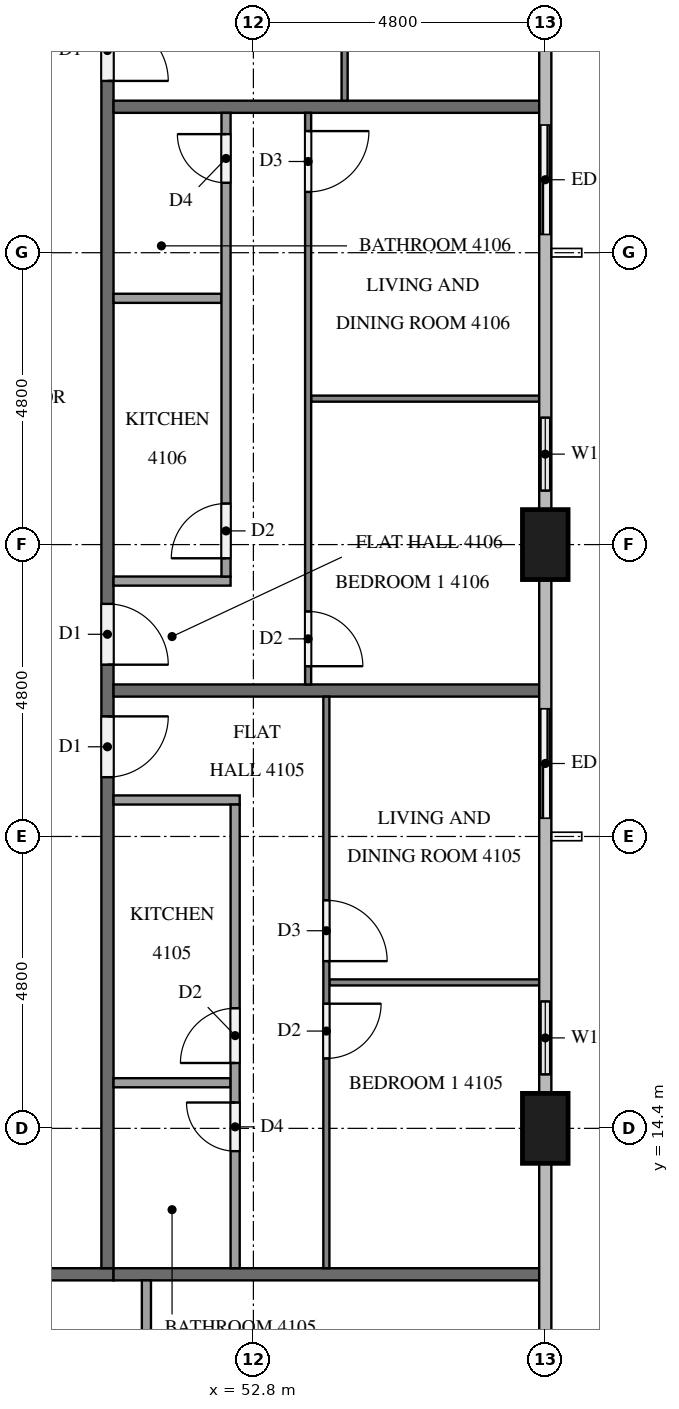
"""IFC4 building model, lengths in metres.
Left out: names, types, materials, properties, quantities, classifications, styles, units other than length and angle.
Written with IfcOpenShell. Run it as: python <this file> out.ifc"""

import sys

from ifc_helpers import new_model, si_unit, direction, frame, frame_2d, origin, origin_2d, place, context, subcontext, project, spatial, rectangle, extrude, element, fill, save


model = new_model("IFC4")
c1 = context("Model", 3, precision=1e-05, world=origin(), true_north=direction((0.0, 1.0)))
c2 = subcontext(c1, "Body", "Model", "MODEL_VIEW")
j1 = project(units=[si_unit("LENGTHUNIT", "METRE"), si_unit("PLANEANGLEUNIT", "RADIAN")], contexts=[c1])
p1 = place(None, origin())
s1 = spatial("IfcSite", under=j1, at=p1, CompositionType="ELEMENT")
p2 = place(p1, origin())
s2 = spatial("IfcBuilding", under=s1, at=p2, CompositionType="ELEMENT")
p3 = place(p2, frame((0.0, 0.0, 159.5)))
s3 = spatial("IfcBuildingStorey", under=s2, at=p3, CompositionType="ELEMENT", Elevation=159.5)
for number, where, z_axis, x_axis in (
    (1, (57.6, 14.4, 0.0), (0.0, 0.0, 1.0), (0.0, 1.0, 0.0)),
    (2, (57.6, 24.0, 0.0), (0.0, 0.0, 1.0), (0.0, 1.0, 0.0)),
):
    element("IfcColumn", number, at=place(p3, frame(where, z_axis=z_axis, x_axis=x_axis)), inside=s3, PredefinedType="COLUMN", context=c2, shape_type="SweptSolid", body=[
        extrude(rectangle(XDim=1.15, YDim=0.75, at=origin_2d()), origin(), (0.0, 0.0, 1.0), 3.2),
    ])
p4 = place(p3, frame((57.6, 14.975, 0.0), z_axis=(0.0, 0.0, 1.0), x_axis=(0.0, 1.0, 0.0)))
e3 = element("IfcWall", 3, at=p4, inside=s3, PredefinedType="SOLIDWALL", context=c2, shape_type="SweptSolid", body=[
    extrude(rectangle(XDim=1.825, YDim=0.15, at=frame_2d((0.913, 0.0))), origin(), (0.0, 0.0, 1.0), 3.2),
])
p5 = place(p4, frame((0.312, 0.0, 0.9)))
e4 = element("IfcOpeningElement", 4, at=p5, cuts=e3, PredefinedType="OPENING", context=c2, shape_type="SweptSolid", body=[
    extrude(rectangle(XDim=1.2, YDim=1.4, at=frame_2d((0.6, 0.7))), frame((0.0, 0.085, 0.0), z_axis=(0.0, -1.0, 0.0), x_axis=(1.0, 0.0, 0.0)), (0.0, 0.0, 1.0), 0.17),
])
p6 = place(p3, frame((57.6, 19.2, 0.0), z_axis=(0.0, 0.0, 1.0), x_axis=(0.0, 1.0, 0.0)))
e5 = element("IfcWall", 5, at=p6, inside=s3, PredefinedType="SOLIDWALL", context=c2, shape_type="SweptSolid", body=[
    extrude(rectangle(XDim=2.4, YDim=0.15, at=frame_2d((1.2, 0.0))), origin(), (0.0, 0.0, 1.0), 3.2),
])
p7 = place(p6, frame((0.3, 0.0, 0.0)))
e6 = element("IfcOpeningElement", 6, at=p7, cuts=e5, PredefinedType="OPENING", context=c2, shape_type="SweptSolid", body=[
    extrude(rectangle(XDim=1.8, YDim=2.4, at=frame_2d((0.9, 1.2))), frame((0.0, 0.085, 0.0), z_axis=(0.0, -1.0, 0.0), x_axis=(1.0, 0.0, 0.0)), (0.0, 0.0, 1.0), 0.17),
])
p8 = place(p3, frame((57.6, 24.575, 0.0), z_axis=(0.0, 0.0, 1.0), x_axis=(0.0, 1.0, 0.0)))
e7 = element("IfcWall", 7, at=p8, inside=s3, PredefinedType="SOLIDWALL", context=c2, shape_type="SweptSolid", body=[
    extrude(rectangle(XDim=1.825, YDim=0.15, at=frame_2d((0.913, 0.0))), origin(), (0.0, 0.0, 1.0), 3.2),
])
p9 = place(p8, frame((0.312, 0.0, 0.9)))
e8 = element("IfcOpeningElement", 8, at=p9, cuts=e7, PredefinedType="OPENING", context=c2, shape_type="SweptSolid", body=[
    extrude(rectangle(XDim=1.2, YDim=1.4, at=frame_2d((0.6, 0.7))), frame((0.0, 0.085, 0.0), z_axis=(0.0, -1.0, 0.0), x_axis=(1.0, 0.0, 0.0)), (0.0, 0.0, 1.0), 0.17),
])
p10 = place(p3, frame((57.6, 28.8, 0.0), z_axis=(0.0, 0.0, 1.0), x_axis=(0.0, 1.0, 0.0)))
e9 = element("IfcWall", 9, at=p10, inside=s3, PredefinedType="SOLIDWALL", context=c2, shape_type="SweptSolid", body=[
    extrude(rectangle(XDim=2.4, YDim=0.15, at=frame_2d((1.2, 0.0))), origin(), (0.0, 0.0, 1.0), 3.2),
])
p11 = place(p10, frame((0.3, 0.0, 0.0)))
e10 = element("IfcOpeningElement", 10, at=p11, cuts=e9, PredefinedType="OPENING", context=c2, shape_type="SweptSolid", body=[
    extrude(rectangle(XDim=1.8, YDim=2.4, at=frame_2d((0.9, 1.2))), frame((0.0, 0.085, 0.0), z_axis=(0.0, -1.0, 0.0), x_axis=(1.0, 0.0, 0.0)), (0.0, 0.0, 1.0), 0.17),
])
p12 = place(p3, frame((50.5, 12.0, 0.0), z_axis=(0.0, 0.0, 1.0), x_axis=(-1.0, 0.0, 0.0)))
e11 = element("IfcWall", 11, at=p12, inside=s3, PredefinedType="PARTITIONING", context=c2, shape_type="SweptSolid", body=[
    extrude(rectangle(XDim=38.6, YDim=0.2, at=frame_2d((19.3, 0.0))), origin(), (0.0, 0.0, 1.0), 3.2),
])
p13 = place(p12, frame((34.125, 0.0, 0.0)))
e12 = element("IfcOpeningElement", 12, at=p13, cuts=e11, PredefinedType="OPENING", context=c2, shape_type="SweptSolid", body=[
    extrude(rectangle(XDim=1.0, YDim=2.1, at=frame_2d((0.5, 1.05))), frame((0.0, 0.11, 0.0), z_axis=(0.0, -1.0, 0.0), x_axis=(1.0, 0.0, 0.0)), (0.0, 0.0, 1.0), 0.22),
])
p14 = place(p12, frame((32.275, 0.0, 0.0)))
e13 = element("IfcOpeningElement", 13, at=p14, cuts=e11, PredefinedType="OPENING", context=c2, shape_type="SweptSolid", body=[
    extrude(rectangle(XDim=1.0, YDim=2.1, at=frame_2d((0.5, 1.05))), frame((0.0, 0.11, 0.0), z_axis=(0.0, -1.0, 0.0), x_axis=(1.0, 0.0, 0.0)), (0.0, 0.0, 1.0), 0.22),
])
p15 = place(p12, frame((12.525, 0.0, 0.0)))
e14 = element("IfcOpeningElement", 14, at=p15, cuts=e11, PredefinedType="OPENING", context=c2, shape_type="SweptSolid", body=[
    extrude(rectangle(XDim=1.0, YDim=2.1, at=frame_2d((0.5, 1.05))), frame((0.0, 0.11, 0.0), z_axis=(0.0, -1.0, 0.0), x_axis=(1.0, 0.0, 0.0)), (0.0, 0.0, 1.0), 0.22),
])
p16 = place(p12, frame((10.625, 0.0, 0.0)))
e15 = element("IfcOpeningElement", 15, at=p16, cuts=e11, PredefinedType="OPENING", context=c2, shape_type="SweptSolid", body=[
    extrude(rectangle(XDim=1.1, YDim=2.1, at=frame_2d((0.55, 1.05))), frame((0.0, 0.11, 0.0), z_axis=(0.0, -1.0, 0.0), x_axis=(1.0, 0.0, 0.0)), (0.0, 0.0, 1.0), 0.22),
])
p17 = place(p3, frame((50.4, 40.7, 0.0), z_axis=(0.0, 0.0, 1.0), x_axis=(0.0, -1.0, 0.0)))
e16 = element("IfcWall", 16, at=p17, inside=s3, PredefinedType="PARTITIONING", context=c2, shape_type="SweptSolid", body=[
    extrude(rectangle(XDim=28.6, YDim=0.2, at=frame_2d((14.3, 0.0))), origin(), (0.0, 0.0, 1.0), 3.2),
])
p18 = place(p17, frame((19.525, 0.0, 0.0)))
e17 = element("IfcOpeningElement", 17, at=p18, cuts=e16, PredefinedType="OPENING", context=c2, shape_type="SweptSolid", body=[
    extrude(rectangle(XDim=1.0, YDim=2.1, at=frame_2d((0.5, 1.05))), frame((0.0, 0.11, 0.0), z_axis=(0.0, -1.0, 0.0), x_axis=(1.0, 0.0, 0.0)), (0.0, 0.0, 1.0), 0.22),
])
p19 = place(p17, frame((17.675, 0.0, 0.0)))
e18 = element("IfcOpeningElement", 18, at=p19, cuts=e16, PredefinedType="OPENING", context=c2, shape_type="SweptSolid", body=[
    extrude(rectangle(XDim=1.0, YDim=2.1, at=frame_2d((0.5, 1.05))), frame((0.0, 0.11, 0.0), z_axis=(0.0, -1.0, 0.0), x_axis=(1.0, 0.0, 0.0)), (0.0, 0.0, 1.0), 0.22),
])
p20 = place(p17, frame((8.075, 0.0, 0.0)))
e19 = element("IfcOpeningElement", 19, at=p20, cuts=e16, PredefinedType="OPENING", context=c2, shape_type="SweptSolid", body=[
    extrude(rectangle(XDim=1.0, YDim=2.1, at=frame_2d((0.5, 1.05))), frame((0.0, 0.11, 0.0), z_axis=(0.0, -1.0, 0.0), x_axis=(1.0, 0.0, 0.0)), (0.0, 0.0, 1.0), 0.22),
])
for number, where, z_axis, x_axis in (
    (20, (50.5, 12.0, 0.0), (0.0, 0.0, 1.0), (1.0, 0.0, 0.0)),
    (21, (50.5, 21.6, 0.0), (0.0, 0.0, 1.0), (1.0, 0.0, 0.0)),
    (22, (50.5, 31.2, 0.0), (0.0, 0.0, 1.0), (1.0, 0.0, 0.0)),
):
    element("IfcWall", number, at=place(p3, frame(where, z_axis=z_axis, x_axis=x_axis)), inside=s3, PredefinedType="PARTITIONING", context=c2, shape_type="SweptSolid", body=[
        extrude(rectangle(XDim=7.0, YDim=0.2, at=frame_2d((3.5, 0.0))), origin(), (0.0, 0.0, 1.0), 3.2),
    ])
p21 = place(p3, frame((51.041, 11.9, 0.0), z_axis=(0.0, 0.0, 1.0), x_axis=(0.0, -1.0, 0.0)))
e23 = element("IfcWall", 23, at=p21, inside=s3, PredefinedType="PARTITIONING", context=c2, shape_type="SweptSolid", body=[
    extrude(rectangle(XDim=4.175, YDim=0.15, at=frame_2d((2.087, 0.0))), origin(), (0.0, 0.0, 1.0), 3.2),
])
p22 = place(p3, frame((54.05, 16.8, 0.0), z_axis=(0.0, 0.0, 1.0), x_axis=(1.0, 0.0, 0.0)))
e24 = element("IfcWall", 24, at=p22, inside=s3, PredefinedType="PARTITIONING", context=c2, shape_type="SweptSolid", body=[
    extrude(rectangle(XDim=3.45, YDim=0.1, at=frame_2d((1.725, 0.0))), origin(), (0.0, 0.0, 1.0), 3.2),
])
p23 = place(p3, frame((54.0, 21.5, 0.0), z_axis=(0.0, 0.0, 1.0), x_axis=(0.0, -1.0, 0.0)))
e25 = element("IfcWall", 25, at=p23, inside=s3, PredefinedType="PARTITIONING", context=c2, shape_type="SweptSolid", body=[
    extrude(rectangle(XDim=9.4, YDim=0.1, at=frame_2d((4.7, 0.0))), origin(), (0.0, 0.0, 1.0), 3.2),
])
p24 = place(p23, frame((3.35, 0.0, 0.0)))
e26 = element("IfcOpeningElement", 26, at=p24, cuts=e25, PredefinedType="OPENING", context=c2, shape_type="SweptSolid", body=[
    extrude(rectangle(XDim=1.0, YDim=2.1, at=frame_2d((0.5, 1.05))), frame((0.0, 0.06, 0.0), z_axis=(0.0, -1.0, 0.0), x_axis=(1.0, 0.0, 0.0)), (0.0, 0.0, 1.0), 0.12),
])
p25 = place(p23, frame((5.05, 0.0, 0.0)))
e27 = element("IfcOpeningElement", 27, at=p25, cuts=e25, PredefinedType="OPENING", context=c2, shape_type="SweptSolid", body=[
    extrude(rectangle(XDim=0.9, YDim=2.1, at=frame_2d((0.45, 1.05))), frame((0.0, 0.06, 0.0), z_axis=(0.0, -1.0, 0.0), x_axis=(1.0, 0.0, 0.0)), (0.0, 0.0, 1.0), 0.12),
])
p26 = place(p3, frame((50.5, 15.15, 0.0), z_axis=(0.0, 0.0, 1.0), x_axis=(1.0, 0.0, 0.0)))
e28 = element("IfcWall", 28, at=p26, inside=s3, PredefinedType="PARTITIONING", context=c2, shape_type="SweptSolid", body=[
    extrude(rectangle(XDim=1.925, YDim=0.15, at=frame_2d((0.962, 0.0))), origin(), (0.0, 0.0, 1.0), 3.2),
])
p27 = place(p3, frame((50.5, 19.8, 0.0), z_axis=(0.0, 0.0, 1.0), x_axis=(1.0, 0.0, 0.0)))
e29 = element("IfcWall", 29, at=p27, inside=s3, PredefinedType="PARTITIONING", context=c2, shape_type="SweptSolid", body=[
    extrude(rectangle(XDim=2.075, YDim=0.15, at=frame_2d((1.038, 0.0))), origin(), (0.0, 0.0, 1.0), 3.2),
])
p28 = place(p3, frame((52.5, 12.1, 0.0), z_axis=(0.0, 0.0, 1.0), x_axis=(0.0, 1.0, 0.0)))
e30 = element("IfcWall", 30, at=p28, inside=s3, PredefinedType="PARTITIONING", context=c2, shape_type="SweptSolid", body=[
    extrude(rectangle(XDim=7.625, YDim=0.15, at=frame_2d((3.812, 0.0))), origin(), (0.0, 0.0, 1.0), 3.2),
])
p29 = place(p28, frame((3.375, 0.0, 0.0)))
e31 = element("IfcOpeningElement", 31, at=p29, cuts=e30, PredefinedType="OPENING", context=c2, shape_type="SweptSolid", body=[
    extrude(rectangle(XDim=0.9, YDim=2.1, at=frame_2d((0.45, 1.05))), frame((0.0, 0.085, 0.0), z_axis=(0.0, -1.0, 0.0), x_axis=(1.0, 0.0, 0.0)), (0.0, 0.0, 1.0), 0.17),
])
p30 = place(p28, frame((1.925, 0.0, 0.0)))
e32 = element("IfcOpeningElement", 32, at=p30, cuts=e30, PredefinedType="OPENING", context=c2, shape_type="SweptSolid", body=[
    extrude(rectangle(XDim=0.8, YDim=2.1, at=frame_2d((0.4, 1.05))), frame((0.0, 0.085, 0.0), z_axis=(0.0, -1.0, 0.0), x_axis=(1.0, 0.0, 0.0)), (0.0, 0.0, 1.0), 0.17),
])
p31 = place(p3, frame((53.75, 26.4, 0.0), z_axis=(0.0, 0.0, 1.0), x_axis=(1.0, 0.0, 0.0)))
e33 = element("IfcWall", 33, at=p31, inside=s3, PredefinedType="PARTITIONING", context=c2, shape_type="SweptSolid", body=[
    extrude(rectangle(XDim=3.75, YDim=0.1, at=frame_2d((1.875, 0.0))), origin(), (0.0, 0.0, 1.0), 3.2),
])
p32 = place(p3, frame((53.7, 31.1, 0.0), z_axis=(0.0, 0.0, 1.0), x_axis=(0.0, -1.0, 0.0)))
e34 = element("IfcWall", 34, at=p32, inside=s3, PredefinedType="PARTITIONING", context=c2, shape_type="SweptSolid", body=[
    extrude(rectangle(XDim=9.4, YDim=0.1, at=frame_2d((4.7, 0.0))), origin(), (0.0, 0.0, 1.0), 3.2),
])
p33 = place(p32, frame((8.2, 0.0, 0.0)))
e35 = element("IfcOpeningElement", 35, at=p33, cuts=e34, PredefinedType="OPENING", context=c2, shape_type="SweptSolid", body=[
    extrude(rectangle(XDim=0.9, YDim=2.1, at=frame_2d((0.45, 1.05))), frame((0.0, 0.06, 0.0), z_axis=(0.0, -1.0, 0.0), x_axis=(1.0, 0.0, 0.0)), (0.0, 0.0, 1.0), 0.12),
])
p34 = place(p32, frame((0.3, 0.0, 0.0)))
e36 = element("IfcOpeningElement", 36, at=p34, cuts=e34, PredefinedType="OPENING", context=c2, shape_type="SweptSolid", body=[
    extrude(rectangle(XDim=1.0, YDim=2.1, at=frame_2d((0.5, 1.05))), frame((0.0, 0.06, 0.0), z_axis=(0.0, -1.0, 0.0), x_axis=(1.0, 0.0, 0.0)), (0.0, 0.0, 1.0), 0.12),
])
p35 = place(p3, frame((50.5, 28.05, 0.0), z_axis=(0.0, 0.0, 1.0), x_axis=(1.0, 0.0, 0.0)))
e37 = element("IfcWall", 37, at=p35, inside=s3, PredefinedType="PARTITIONING", context=c2, shape_type="SweptSolid", body=[
    extrude(rectangle(XDim=1.775, YDim=0.15, at=frame_2d((0.887, 0.0))), origin(), (0.0, 0.0, 1.0), 3.2),
])
p36 = place(p3, frame((50.5, 23.4, 0.0), z_axis=(0.0, 0.0, 1.0), x_axis=(1.0, 0.0, 0.0)))
e38 = element("IfcWall", 38, at=p36, inside=s3, PredefinedType="PARTITIONING", context=c2, shape_type="SweptSolid", body=[
    extrude(rectangle(XDim=1.925, YDim=0.15, at=frame_2d((0.962, 0.0))), origin(), (0.0, 0.0, 1.0), 3.2),
])
p37 = place(p3, frame((52.35, 23.475, 0.0), z_axis=(0.0, 0.0, 1.0), x_axis=(0.0, 1.0, 0.0)))
e39 = element("IfcWall", 39, at=p37, inside=s3, PredefinedType="PARTITIONING", context=c2, shape_type="SweptSolid", body=[
    extrude(rectangle(XDim=7.625, YDim=0.15, at=frame_2d((3.812, 0.0))), origin(), (0.0, 0.0, 1.0), 3.2),
])
p38 = place(p37, frame((0.3, 0.0, 0.0)))
e40 = element("IfcOpeningElement", 40, at=p38, cuts=e39, PredefinedType="OPENING", context=c2, shape_type="SweptSolid", body=[
    extrude(rectangle(XDim=0.9, YDim=2.1, at=frame_2d((0.45, 1.05))), frame((0.0, 0.085, 0.0), z_axis=(0.0, -1.0, 0.0), x_axis=(1.0, 0.0, 0.0)), (0.0, 0.0, 1.0), 0.17),
])
p39 = place(p37, frame((6.475, 0.0, 0.0)))
e41 = element("IfcOpeningElement", 41, at=p39, cuts=e39, PredefinedType="OPENING", context=c2, shape_type="SweptSolid", body=[
    extrude(rectangle(XDim=0.8, YDim=2.1, at=frame_2d((0.4, 1.05))), frame((0.0, 0.085, 0.0), z_axis=(0.0, -1.0, 0.0), x_axis=(1.0, 0.0, 0.0)), (0.0, 0.0, 1.0), 0.17),
])
p40 = place(p3, frame((54.3, 47.498, 0.0), z_axis=(0.0, 0.0, 1.0), x_axis=(0.0, -1.0, 0.0)))
e42 = element("IfcWall", 42, at=p40, inside=s3, PredefinedType="PARTITIONING", context=c2, shape_type="SweptSolid", body=[
    extrude(rectangle(XDim=16.198, YDim=0.1, at=frame_2d((8.099, 0.0))), origin(), (0.0, 0.0, 1.0), 3.2),
])
p41 = place(p40, frame((11.848, 0.0, 0.0)))
e43 = element("IfcOpeningElement", 43, at=p41, cuts=e42, PredefinedType="OPENING", context=c2, shape_type="SweptSolid", body=[
    extrude(rectangle(XDim=0.9, YDim=2.1, at=frame_2d((0.45, 1.05))), frame((0.0, 0.06, 0.0), z_axis=(0.0, -1.0, 0.0), x_axis=(1.0, 0.0, 0.0)), (0.0, 0.0, 1.0), 0.12),
])
p42 = place(p40, frame((10.248, 0.0, 0.0)))
e44 = element("IfcOpeningElement", 44, at=p42, cuts=e42, PredefinedType="OPENING", context=c2, shape_type="SweptSolid", body=[
    extrude(rectangle(XDim=0.9, YDim=2.1, at=frame_2d((0.45, 1.05))), frame((0.0, 0.06, 0.0), z_axis=(0.0, -1.0, 0.0), x_axis=(1.0, 0.0, 0.0)), (0.0, 0.0, 1.0), 0.12),
])
p43 = place(p40, frame((0.3, 0.0, 0.0)))
e45 = element("IfcOpeningElement", 45, at=p43, cuts=e42, PredefinedType="OPENING", context=c2, shape_type="SweptSolid", body=[
    extrude(rectangle(XDim=1.0, YDim=2.1, at=frame_2d((0.5, 1.05))), frame((0.0, 0.06, 0.0), z_axis=(0.0, -1.0, 0.0), x_axis=(1.0, 0.0, 0.0)), (0.0, 0.0, 1.0), 0.12),
])
p44 = place(p5, origin())
e46 = element("IfcWindow", 46, at=p44, inside=s3, PartitioningType="SINGLE_PANEL", PredefinedType="WINDOW", context=c2, shape_type="SweptSolid", body=[
    extrude(rectangle(XDim=1.2, YDim=1.4, at=frame_2d((0.6, 0.7))), frame((0.0, 0.03, 0.0), z_axis=(0.0, -1.0, 0.0), x_axis=(1.0, 0.0, 0.0)), (0.0, 0.0, 1.0), 0.06),
])
fill(e4, e46)
p45 = place(p7, origin())
e47 = element("IfcDoor", 47, at=p45, inside=s3, OperationType="SLIDING_TO_LEFT", PredefinedType="DOOR", context=c2, shape_type="SweptSolid", body=[
    extrude(rectangle(XDim=1.8, YDim=2.4, at=frame_2d((0.9, 1.2))), frame((0.0, 0.025, 0.0), z_axis=(0.0, -1.0, 0.0), x_axis=(1.0, 0.0, 0.0)), (0.0, 0.0, 1.0), 0.05),
])
fill(e6, e47)
p46 = place(p9, origin())
e48 = element("IfcWindow", 48, at=p46, inside=s3, PartitioningType="SINGLE_PANEL", PredefinedType="WINDOW", context=c2, shape_type="SweptSolid", body=[
    extrude(rectangle(XDim=1.2, YDim=1.4, at=frame_2d((0.6, 0.7))), frame((0.0, 0.03, 0.0), z_axis=(0.0, -1.0, 0.0), x_axis=(1.0, 0.0, 0.0)), (0.0, 0.0, 1.0), 0.06),
])
fill(e8, e48)
p47 = place(p11, origin())
e49 = element("IfcDoor", 49, at=p47, inside=s3, OperationType="SLIDING_TO_RIGHT", PredefinedType="DOOR", context=c2, shape_type="SweptSolid", body=[
    extrude(rectangle(XDim=1.8, YDim=2.4, at=frame_2d((0.9, 1.2))), frame((0.0, 0.025, 0.0), z_axis=(0.0, -1.0, 0.0), x_axis=(1.0, 0.0, 0.0)), (0.0, 0.0, 1.0), 0.05),
])
fill(e10, e49)
p48 = place(p18, origin())
e50 = element("IfcDoor", 50, at=p48, inside=s3, OperationType="SINGLE_SWING_LEFT", PredefinedType="DOOR", context=c2, shape_type="SweptSolid", body=[
    extrude(rectangle(XDim=1.0, YDim=2.1, at=frame_2d((0.5, 1.05))), frame((0.0, 0.025, 0.0), z_axis=(0.0, -1.0, 0.0), x_axis=(1.0, 0.0, 0.0)), (0.0, 0.0, 1.0), 0.05),
])
fill(e17, e50)
p49 = place(p19, origin())
e51 = element("IfcDoor", 51, at=p49, inside=s3, OperationType="SINGLE_SWING_RIGHT", PredefinedType="DOOR", context=c2, shape_type="SweptSolid", body=[
    extrude(rectangle(XDim=1.0, YDim=2.1, at=frame_2d((0.5, 1.05))), frame((0.0, 0.025, 0.0), z_axis=(0.0, -1.0, 0.0), x_axis=(1.0, 0.0, 0.0)), (0.0, 0.0, 1.0), 0.05),
])
fill(e18, e51)
p50 = place(p20, origin())
e52 = element("IfcDoor", 52, at=p50, inside=s3, OperationType="SINGLE_SWING_RIGHT", PredefinedType="DOOR", context=c2, shape_type="SweptSolid", body=[
    extrude(rectangle(XDim=1.0, YDim=2.1, at=frame_2d((0.5, 1.05))), frame((0.0, 0.025, 0.0), z_axis=(0.0, -1.0, 0.0), x_axis=(1.0, 0.0, 0.0)), (0.0, 0.0, 1.0), 0.05),
])
fill(e19, e52)
p51 = place(p24, origin())
e53 = element("IfcDoor", 53, at=p51, inside=s3, OperationType="SINGLE_SWING_RIGHT", PredefinedType="DOOR", context=c2, shape_type="SweptSolid", body=[
    extrude(rectangle(XDim=1.0, YDim=2.1, at=frame_2d((0.5, 1.05))), frame((0.0, 0.025, 0.0), z_axis=(0.0, -1.0, 0.0), x_axis=(1.0, 0.0, 0.0)), (0.0, 0.0, 1.0), 0.05),
])
fill(e26, e53)
p52 = place(p25, origin())
e54 = element("IfcDoor", 54, at=p52, inside=s3, OperationType="SINGLE_SWING_LEFT", PredefinedType="DOOR", context=c2, shape_type="SweptSolid", body=[
    extrude(rectangle(XDim=0.9, YDim=2.1, at=frame_2d((0.45, 1.05))), frame((0.0, 0.025, 0.0), z_axis=(0.0, -1.0, 0.0), x_axis=(1.0, 0.0, 0.0)), (0.0, 0.0, 1.0), 0.05),
])
fill(e27, e54)
p53 = place(p29, origin())
e55 = element("IfcDoor", 55, at=p53, inside=s3, OperationType="SINGLE_SWING_LEFT", PredefinedType="DOOR", context=c2, shape_type="SweptSolid", body=[
    extrude(rectangle(XDim=0.9, YDim=2.1, at=frame_2d((0.45, 1.05))), frame((0.0, 0.025, 0.0), z_axis=(0.0, -1.0, 0.0), x_axis=(1.0, 0.0, 0.0)), (0.0, 0.0, 1.0), 0.05),
])
fill(e31, e55)
p54 = place(p30, origin())
e56 = element("IfcDoor", 56, at=p54, inside=s3, OperationType="SINGLE_SWING_RIGHT", PredefinedType="DOOR", context=c2, shape_type="SweptSolid", body=[
    extrude(rectangle(XDim=0.8, YDim=2.1, at=frame_2d((0.4, 1.05))), frame((0.0, 0.025, 0.0), z_axis=(0.0, -1.0, 0.0), x_axis=(1.0, 0.0, 0.0)), (0.0, 0.0, 1.0), 0.05),
])
fill(e32, e56)
p55 = place(p33, origin())
e57 = element("IfcDoor", 57, at=p55, inside=s3, OperationType="SINGLE_SWING_RIGHT", PredefinedType="DOOR", context=c2, shape_type="SweptSolid", body=[
    extrude(rectangle(XDim=0.9, YDim=2.1, at=frame_2d((0.45, 1.05))), frame((0.0, 0.025, 0.0), z_axis=(0.0, -1.0, 0.0), x_axis=(1.0, 0.0, 0.0)), (0.0, 0.0, 1.0), 0.05),
])
fill(e35, e57)
p56 = place(p34, origin())
e58 = element("IfcDoor", 58, at=p56, inside=s3, OperationType="SINGLE_SWING_LEFT", PredefinedType="DOOR", context=c2, shape_type="SweptSolid", body=[
    extrude(rectangle(XDim=1.0, YDim=2.1, at=frame_2d((0.5, 1.05))), frame((0.0, 0.025, 0.0), z_axis=(0.0, -1.0, 0.0), x_axis=(1.0, 0.0, 0.0)), (0.0, 0.0, 1.0), 0.05),
])
fill(e36, e58)
p57 = place(p38, origin())
e59 = element("IfcDoor", 59, at=p57, inside=s3, OperationType="SINGLE_SWING_LEFT", PredefinedType="DOOR", context=c2, shape_type="SweptSolid", body=[
    extrude(rectangle(XDim=0.9, YDim=2.1, at=frame_2d((0.45, 1.05))), frame((0.0, 0.025, 0.0), z_axis=(0.0, -1.0, 0.0), x_axis=(1.0, 0.0, 0.0)), (0.0, 0.0, 1.0), 0.05),
])
fill(e40, e59)
p58 = place(p39, origin())
e60 = element("IfcDoor", 60, at=p58, inside=s3, OperationType="SINGLE_SWING_RIGHT", PredefinedType="DOOR", context=c2, shape_type="SweptSolid", body=[
    extrude(rectangle(XDim=0.8, YDim=2.1, at=frame_2d((0.4, 1.05))), frame((0.0, 0.025, 0.0), z_axis=(0.0, -1.0, 0.0), x_axis=(1.0, 0.0, 0.0)), (0.0, 0.0, 1.0), 0.05),
])
fill(e41, e60)
save(model, sys.argv[1])
